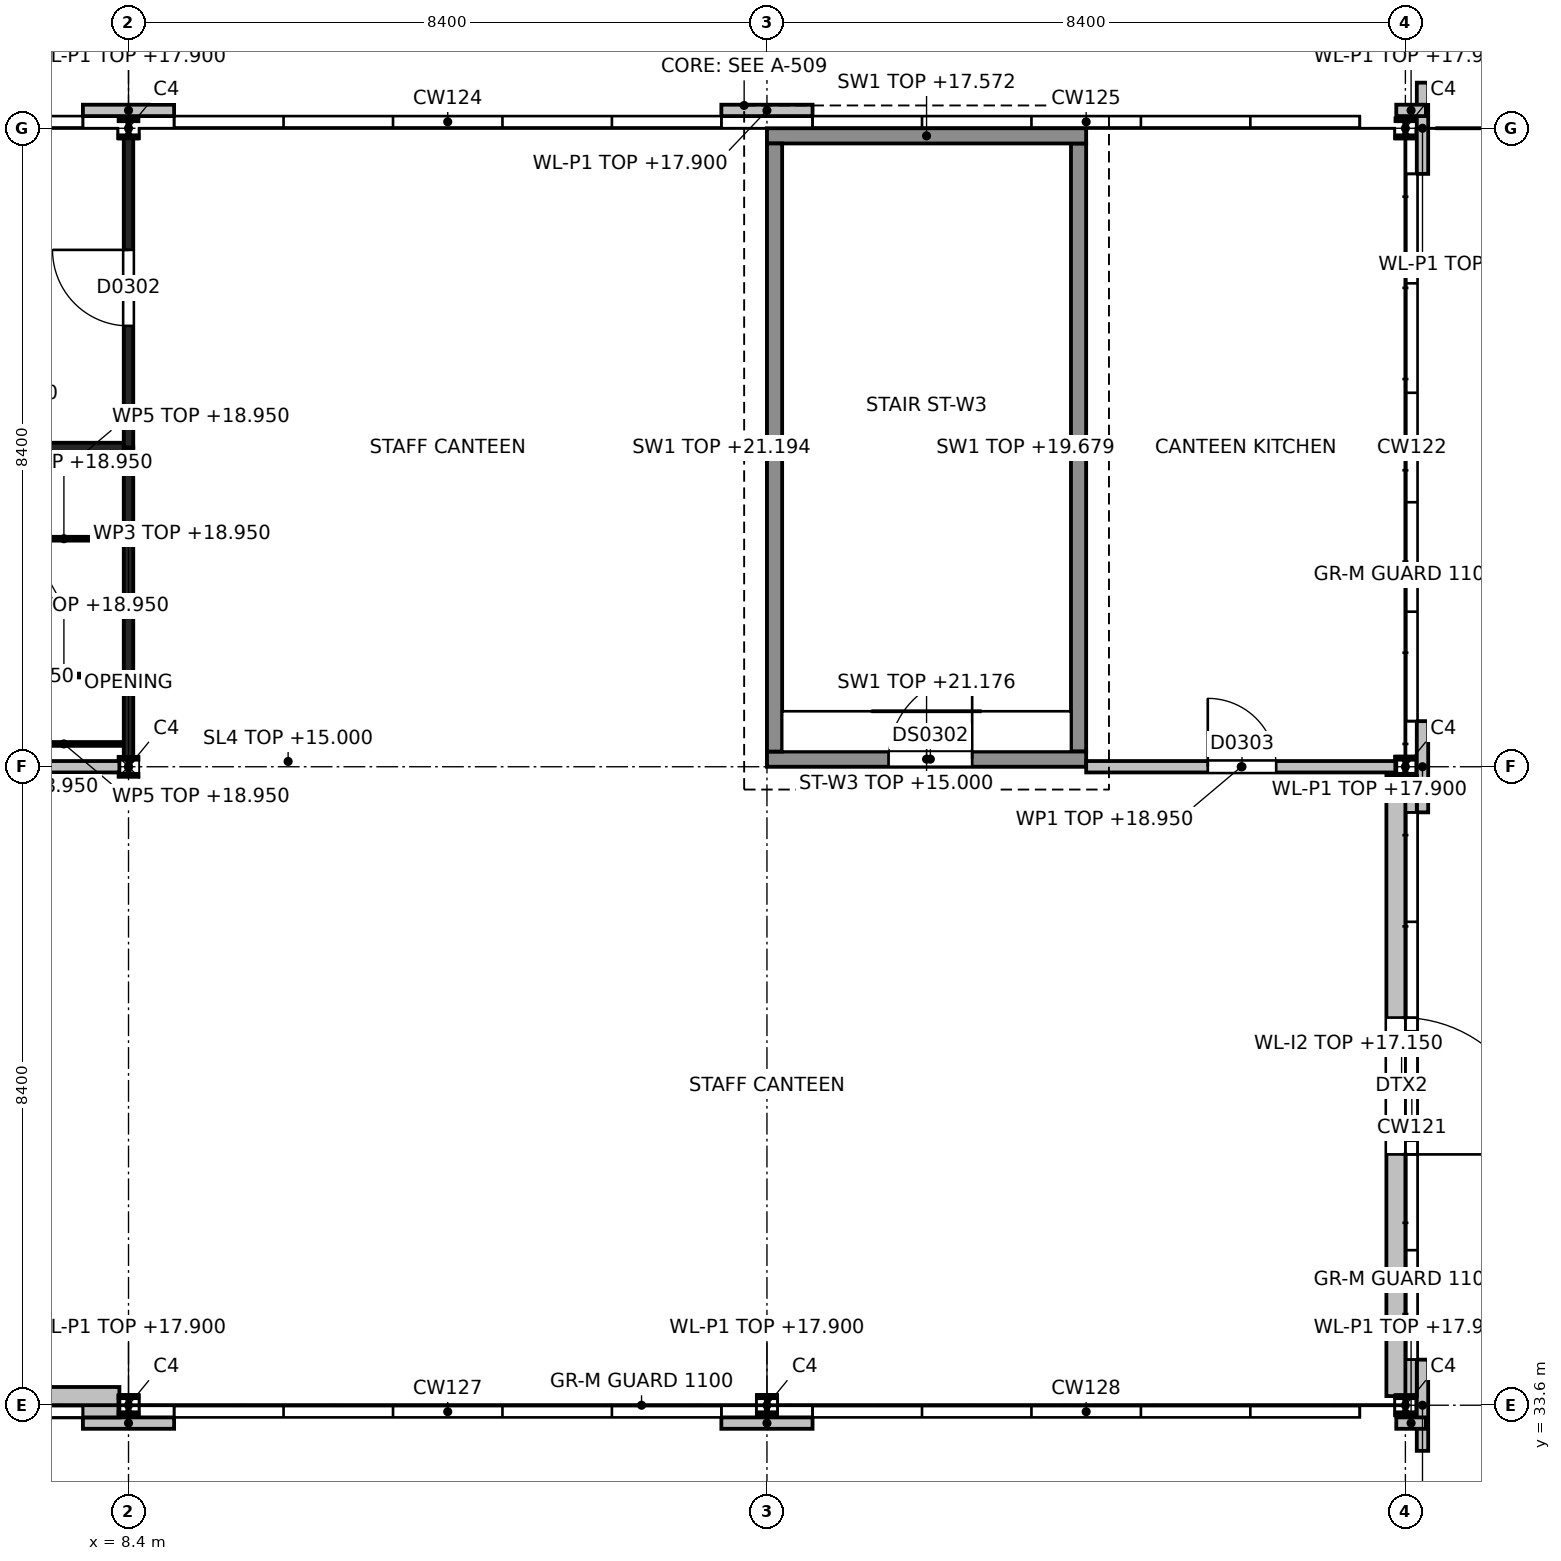
"""IFC4 building model, lengths in metres.
Left out: names, types, materials, properties, quantities, classifications, styles, units other than length and angle.
Written with IfcOpenShell. Run it as: python <this file> out.ifc"""

import sys

from ifc_helpers import new_model, si_unit, direction, frame, frame_2d, origin, origin_2d, place, context, subcontext, project, spatial, polyline, rectangle, i_section, outline, extrude, element, fill, save


model = new_model("IFC4")
c1 = context("Model", 3, precision=1e-05, world=origin(), true_north=direction((0.0, 1.0)))
c2 = subcontext(c1, "Body", "Model", "MODEL_VIEW")
j1 = project(units=[si_unit("LENGTHUNIT", "METRE"), si_unit("PLANEANGLEUNIT", "RADIAN")], contexts=[c1])
p1 = place(None, origin())
s1 = spatial("IfcSite", under=j1, at=p1, CompositionType="ELEMENT")
p2 = place(p1, origin())
s2 = spatial("IfcBuilding", under=s1, at=p2, CompositionType="ELEMENT")
p3 = place(p2, frame((0.0, 0.0, 15.0)))
s3 = spatial("IfcBuildingStorey", under=s2, at=p3, CompositionType="ELEMENT", Elevation=15.0)
p4 = place(p3, frame((8.4, 33.6, 0.0), z_axis=(0.0, 0.0, 1.0), x_axis=(1.0, 0.0, 0.0)))
e1 = element("IfcColumn", 1, at=p4, inside=s3, PredefinedType="COLUMN", context=c2, shape_type="SweptSolid", body=[
    extrude(i_section(OverallWidth=0.24, OverallDepth=0.24, WebThickness=0.01, FlangeThickness=0.017, at=origin_2d()), origin(), (0.0, 0.0, 1.0), 2.635),
])
p5 = place(p3, frame((8.4, 42.0, 0.0), z_axis=(0.0, 0.0, 1.0), x_axis=(1.0, 0.0, 0.0)))
e2 = element("IfcColumn", 2, at=p5, inside=s3, PredefinedType="COLUMN", context=c2, shape_type="SweptSolid", body=[
    extrude(i_section(OverallWidth=0.24, OverallDepth=0.24, WebThickness=0.01, FlangeThickness=0.017, at=origin_2d()), origin(), (0.0, 0.0, 1.0), 6.029),
])
for number, where, z_axis, x_axis in (
    (3, (8.4, 50.4, 0.0), (0.0, 0.0, 1.0), (1.0, 0.0, 0.0)),
    (4, (16.8, 33.6, 0.0), (0.0, 0.0, 1.0), (1.0, 0.0, 0.0)),
    (5, (25.2, 33.6, 0.0), (0.0, 0.0, 1.0), (1.0, 0.0, 0.0)),
    (6, (25.2, 42.0, 0.0), (0.0, 0.0, 1.0), (1.0, 0.0, 0.0)),
    (7, (25.2, 50.4, 0.0), (0.0, 0.0, 1.0), (1.0, 0.0, 0.0)),
):
    element("IfcColumn", number, at=place(p3, frame(where, z_axis=z_axis, x_axis=x_axis)), inside=s3, PredefinedType="COLUMN", context=c2, shape_type="SweptSolid", body=[
        extrude(i_section(OverallWidth=0.24, OverallDepth=0.24, WebThickness=0.01, FlangeThickness=0.017, at=origin_2d()), origin(), (0.0, 0.0, 1.0), 2.635),
    ])
p6 = place(p3, frame((16.8, 42.1, 0.0), z_axis=(0.0, 0.0, 1.0), x_axis=(1.0, 0.0, 0.0)))
e8 = element("IfcWall", 8, at=p6, inside=s3, PredefinedType="SHEAR", context=c2, shape_type="SweptSolid", body=[
    extrude(outline(polyline([(0.0, 0.0), (4.2, 0.0), (4.2, 4.679), (0.494, 6.176), (0.247, 5.875), (0.0, 5.925), (0.0, 0.0)])), frame((0.0, 0.1, 0.0), z_axis=(0.0, -1.0, 0.0), x_axis=(1.0, 0.0, 0.0)), (0.0, 0.0, 1.0), 0.2),
])
p7 = place(p6, frame((1.6, 0.0, 0.0)))
e9 = element("IfcOpeningElement", 9, at=p7, cuts=e8, PredefinedType="OPENING", context=c2, shape_type="SweptSolid", body=[
    extrude(rectangle(XDim=1.1, YDim=2.1, at=frame_2d((0.55, 1.05))), frame((0.0, 0.1, 0.0), z_axis=(0.0, -1.0, 0.0), x_axis=(1.0, 0.0, 0.0)), (0.0, 0.0, 1.0), 0.2),
])
p8 = place(p3, frame((16.8, 50.3, 0.0), z_axis=(0.0, 0.0, 1.0), x_axis=(1.0, 0.0, 0.0)))
e10 = element("IfcWall", 10, at=p8, inside=s3, PredefinedType="SHEAR", context=c2, shape_type="SweptSolid", body=[
    extrude(outline(polyline([(0.0, 0.0), (4.2, 0.0), (4.2, 2.572), (0.0, 2.572), (0.0, 0.0)])), frame((0.0, 0.1, 0.0), z_axis=(0.0, -1.0, 0.0), x_axis=(1.0, 0.0, 0.0)), (0.0, 0.0, 1.0), 0.2),
])
p9 = place(p3, frame((16.9, 42.2, 0.0), z_axis=(0.0, 0.0, 1.0), x_axis=(0.0, 1.0, 0.0)))
e11 = element("IfcWall", 11, at=p9, inside=s3, PredefinedType="SHEAR", context=c2, shape_type="SweptSolid", body=[
    extrude(outline(polyline([(0.0, 0.0), (8.0, 0.0), (8.0, 3.062), (0.25, 6.194), (0.0, 5.885), (0.0, 0.0)])), frame((0.0, 0.1, 0.0), z_axis=(0.0, -1.0, 0.0), x_axis=(1.0, 0.0, 0.0)), (0.0, 0.0, 1.0), 0.2),
])
p10 = place(p3, frame((20.9, 42.2, 0.0), z_axis=(0.0, 0.0, 1.0), x_axis=(0.0, 1.0, 0.0)))
e12 = element("IfcWall", 12, at=p10, inside=s3, PredefinedType="SHEAR", context=c2, shape_type="SweptSolid", body=[
    extrude(outline(polyline([(0.0, 0.0), (8.0, 0.0), (8.0, 3.062), (4.25, 4.578), (4.0, 4.268), (3.75, 4.339), (3.5, 4.679), (0.0, 4.679), (0.0, 0.0)])), frame((0.0, 0.1, 0.0), z_axis=(0.0, -1.0, 0.0), x_axis=(1.0, 0.0, 0.0)), (0.0, 0.0, 1.0), 0.2),
])
for number, where, z_axis, x_axis in (
    (13, (7.8, 50.635, 0.0), (0.0, 0.0, 1.0), (1.0, 0.0, 0.0)),
    (14, (16.2, 50.635, 0.0), (0.0, 0.0, 1.0), (1.0, 0.0, 0.0)),
):
    element("IfcWall", number, at=place(p3, frame(where, z_axis=z_axis, x_axis=x_axis)), inside=s3, PredefinedType="SOLIDWALL", context=c2, shape_type="SweptSolid", body=[
        extrude(rectangle(XDim=1.2, YDim=0.15, at=frame_2d((0.6, 0.0))), origin(), (0.0, 0.0, 1.0), 2.9),
    ])
p11 = place(p3, frame((25.08, 50.635, 0.0), z_axis=(0.0, 0.0, 1.0), x_axis=(1.0, 0.0, 0.0)))
e15 = element("IfcWall", 15, at=p11, inside=s3, PredefinedType="SOLIDWALL", context=c2, shape_type="SweptSolid", body=[
    extrude(rectangle(XDim=0.39, YDim=0.15, at=frame_2d((0.195, 0.0))), origin(), (0.0, 0.0, 1.0), 2.9),
])
p12 = place(p3, frame((25.15, 33.72, 0.0), z_axis=(0.0, 0.0, 1.0), x_axis=(0.0, 1.0, 0.0)))
e16 = element("IfcWall", 16, at=p12, inside=s3, PredefinedType="SOLIDWALL", context=c2, shape_type="SweptSolid", body=[
    extrude(rectangle(XDim=8.16, YDim=0.4, at=frame_2d((4.08, 0.0))), origin(), (0.0, 0.0, 1.0), 2.15),
])
p13 = place(p12, frame((3.18, 0.0, 0.0)))
e17 = element("IfcOpeningElement", 17, at=p13, cuts=e16, PredefinedType="OPENING", context=c2, shape_type="SweptSolid", body=[
    extrude(rectangle(XDim=1.8, YDim=2.4, at=frame_2d((0.9, 1.2))), frame((0.0, 0.2, 0.0), z_axis=(0.0, -1.0, 0.0), x_axis=(1.0, 0.0, 0.0)), (0.0, 0.0, 1.0), 0.4),
])
p14 = place(p3, frame((25.425, 33.0, 0.0), z_axis=(0.0, 0.0, 1.0), x_axis=(0.0, 1.0, 0.0)))
e18 = element("IfcWall", 18, at=p14, inside=s3, PredefinedType="SOLIDWALL", context=c2, shape_type="SweptSolid", body=[
    extrude(rectangle(XDim=1.2, YDim=0.15, at=frame_2d((0.6, 0.0))), origin(), (0.0, 0.0, 1.0), 2.9),
])
p15 = place(p3, frame((25.425, 41.4, 0.0), z_axis=(0.0, 0.0, 1.0), x_axis=(0.0, 1.0, 0.0)))
e19 = element("IfcWall", 19, at=p15, inside=s3, PredefinedType="SOLIDWALL", context=c2, shape_type="SweptSolid", body=[
    extrude(rectangle(XDim=1.2, YDim=0.15, at=frame_2d((0.6, 0.0))), origin(), (0.0, 0.0, 1.0), 2.9),
])
p16 = place(p3, frame((25.425, 49.8, 0.0), z_axis=(0.0, 0.0, 1.0), x_axis=(0.0, 1.0, 0.0)))
e20 = element("IfcWall", 20, at=p16, inside=s3, PredefinedType="SOLIDWALL", context=c2, shape_type="SweptSolid", body=[
    extrude(rectangle(XDim=1.2, YDim=0.15, at=frame_2d((0.6, 0.0))), origin(), (0.0, 0.0, 1.0), 2.9),
])
p17 = place(p3, frame((0.12, 33.64, 0.0), z_axis=(0.0, 0.0, 1.0), x_axis=(1.0, 0.0, 0.0)))
e21 = element("IfcWall", 21, at=p17, inside=s3, PredefinedType="SOLIDWALL", context=c2, shape_type="SweptSolid", body=[
    extrude(rectangle(XDim=8.16, YDim=0.4, at=frame_2d((4.08, 0.0))), origin(), (0.0, 0.0, 1.0), 2.15),
])
p18 = place(p17, frame((3.18, 0.0, 0.0)))
e22 = element("IfcOpeningElement", 22, at=p18, cuts=e21, PredefinedType="OPENING", context=c2, shape_type="SweptSolid", body=[
    extrude(rectangle(XDim=1.8, YDim=2.4, at=frame_2d((0.9, 1.2))), frame((0.0, 0.2, 0.0), z_axis=(0.0, -1.0, 0.0), x_axis=(1.0, 0.0, 0.0)), (0.0, 0.0, 1.0), 0.4),
])
for number, where, z_axis, x_axis in (
    (23, (7.8, 33.365, 0.0), (0.0, 0.0, 1.0), (1.0, 0.0, 0.0)),
    (24, (16.2, 33.365, 0.0), (0.0, 0.0, 1.0), (1.0, 0.0, 0.0)),
):
    element("IfcWall", number, at=place(p3, frame(where, z_axis=z_axis, x_axis=x_axis)), inside=s3, PredefinedType="SOLIDWALL", context=c2, shape_type="SweptSolid", body=[
        extrude(rectangle(XDim=1.2, YDim=0.15, at=frame_2d((0.6, 0.0))), origin(), (0.0, 0.0, 1.0), 2.9),
    ])
p19 = place(p3, frame((25.08, 33.365, 0.0), z_axis=(0.0, 0.0, 1.0), x_axis=(1.0, 0.0, 0.0)))
e25 = element("IfcWall", 25, at=p19, inside=s3, PredefinedType="SOLIDWALL", context=c2, shape_type="SweptSolid", body=[
    extrude(rectangle(XDim=0.39, YDim=0.15, at=frame_2d((0.195, 0.0))), origin(), (0.0, 0.0, 1.0), 2.9),
])
p20 = place(p3, frame((4.2, 42.0, 0.0), z_axis=(0.0, 0.0, 1.0), x_axis=(1.0, 0.0, 0.0)))
e26 = element("IfcWall", 26, at=p20, inside=s3, PredefinedType="PARTITIONING", context=c2, shape_type="SweptSolid", body=[
    extrude(rectangle(XDim=4.08, YDim=0.15, at=frame_2d((2.04, 0.0))), origin(), (0.0, 0.0, 1.0), 3.95),
])
p21 = place(p20, frame((1.6, 0.0, 0.0)))
e27 = element("IfcOpeningElement", 27, at=p21, cuts=e26, PredefinedType="OPENING", context=c2, shape_type="SweptSolid", body=[
    extrude(rectangle(XDim=0.9, YDim=2.1, at=frame_2d((0.45, 1.05))), frame((0.0, 0.075, 0.0), z_axis=(0.0, -1.0, 0.0), x_axis=(1.0, 0.0, 0.0)), (0.0, 0.0, 1.0), 0.15),
])
p22 = place(p3, frame((4.2, 46.2, 0.0), z_axis=(0.0, 0.0, 1.0), x_axis=(1.0, 0.0, 0.0)))
e28 = element("IfcWall", 28, at=p22, inside=s3, PredefinedType="PARTITIONING", context=c2, shape_type="SweptSolid", body=[
    extrude(rectangle(XDim=4.2, YDim=0.125, at=frame_2d((2.1, 0.0))), origin(), (0.0, 0.0, 1.0), 3.95),
])
p23 = place(p3, frame((8.4, 42.12, 0.0), z_axis=(0.0, 0.0, 1.0), x_axis=(0.0, 1.0, 0.0)))
e29 = element("IfcWall", 29, at=p23, inside=s3, PredefinedType="PARTITIONING", context=c2, shape_type="SweptSolid", body=[
    extrude(rectangle(XDim=4.08, YDim=0.125, at=frame_2d((2.04, 0.0))), origin(), (0.0, 0.0, 1.0), 3.95),
])
p24 = place(p3, frame((8.4, 46.2, 0.0), z_axis=(0.0, 0.0, 1.0), x_axis=(0.0, 1.0, 0.0)))
e30 = element("IfcWall", 30, at=p24, inside=s3, PredefinedType="PARTITIONING", context=c2, shape_type="SweptSolid", body=[
    extrude(rectangle(XDim=4.08, YDim=0.125, at=frame_2d((2.04, 0.0))), origin(), (0.0, 0.0, 1.0), 3.95),
])
p25 = place(p24, frame((1.6, 0.0, 0.0)))
e31 = element("IfcOpeningElement", 31, at=p25, cuts=e30, PredefinedType="OPENING", context=c2, shape_type="SweptSolid", body=[
    extrude(rectangle(XDim=1.0, YDim=2.1, at=frame_2d((0.5, 1.05))), frame((0.0, 0.062, 0.0), z_axis=(0.0, -1.0, 0.0), x_axis=(1.0, 0.0, 0.0)), (0.0, 0.0, 1.0), 0.125),
])
p26 = place(p3, frame((21.0, 42.0, 0.0), z_axis=(0.0, 0.0, 1.0), x_axis=(1.0, 0.0, 0.0)))
e32 = element("IfcWall", 32, at=p26, inside=s3, PredefinedType="PARTITIONING", context=c2, shape_type="SweptSolid", body=[
    extrude(rectangle(XDim=4.08, YDim=0.15, at=frame_2d((2.04, 0.0))), origin(), (0.0, 0.0, 1.0), 3.95),
])
p27 = place(p26, frame((1.6, 0.0, 0.0)))
e33 = element("IfcOpeningElement", 33, at=p27, cuts=e32, PredefinedType="OPENING", context=c2, shape_type="SweptSolid", body=[
    extrude(rectangle(XDim=0.9, YDim=2.1, at=frame_2d((0.45, 1.05))), frame((0.0, 0.075, 0.0), z_axis=(0.0, -1.0, 0.0), x_axis=(1.0, 0.0, 0.0)), (0.0, 0.0, 1.0), 0.15),
])
for number, where, z_axis, x_axis in (
    (34, (8.4, 42.3, 0.0), (0.0, 0.0, 1.0), (-1.0, 0.0, 0.0)),
    (35, (8.4, 43.2, 0.0), (0.0, 0.0, 1.0), (-1.0, 0.0, 0.0)),
    (36, (8.4, 44.1, 0.0), (0.0, 0.0, 1.0), (-1.0, 0.0, 0.0)),
    (37, (8.4, 45.0, 0.0), (0.0, 0.0, 1.0), (-1.0, 0.0, 0.0)),
    (38, (8.4, 45.9, 0.0), (0.0, 0.0, 1.0), (-1.0, 0.0, 0.0)),
):
    element("IfcWall", number, at=place(p3, frame(where, z_axis=z_axis, x_axis=x_axis)), inside=s3, PredefinedType="PARTITIONING", context=c2, shape_type="SweptSolid", body=[
        extrude(rectangle(XDim=1.7, YDim=0.05, at=frame_2d((0.85, 0.0))), origin(), (0.0, 0.0, 1.0), 3.95),
    ])
p28 = place(p13, origin())
e39 = element("IfcDoor", 39, at=p28, inside=s3, OperationType="DOUBLE_DOOR_SINGLE_SWING", PredefinedType="DOOR", context=c2, shape_type="SweptSolid", body=[
    extrude(rectangle(XDim=1.8, YDim=2.4, at=frame_2d((0.9, 1.2))), frame((0.0, 0.025, 0.0), z_axis=(0.0, -1.0, 0.0), x_axis=(1.0, 0.0, 0.0)), (0.0, 0.0, 1.0), 0.05),
])
fill(e17, e39)
p29 = place(p25, origin())
e40 = element("IfcDoor", 40, at=p29, inside=s3, OperationType="SINGLE_SWING_RIGHT", PredefinedType="DOOR", context=c2, shape_type="SweptSolid", body=[
    extrude(rectangle(XDim=1.0, YDim=2.1, at=frame_2d((0.5, 1.05))), frame((0.0, 0.025, 0.0), z_axis=(0.0, -1.0, 0.0), x_axis=(1.0, 0.0, 0.0)), (0.0, 0.0, 1.0), 0.05),
])
fill(e31, e40)
p30 = place(p27, origin())
e41 = element("IfcDoor", 41, at=p30, inside=s3, OperationType="SINGLE_SWING_LEFT", PredefinedType="DOOR", context=c2, shape_type="SweptSolid", body=[
    extrude(rectangle(XDim=0.9, YDim=2.1, at=frame_2d((0.45, 1.05))), frame((0.0, 0.025, 0.0), z_axis=(0.0, -1.0, 0.0), x_axis=(1.0, 0.0, 0.0)), (0.0, 0.0, 1.0), 0.05),
])
fill(e33, e41)
p31 = place(p7, origin())
e42 = element("IfcDoor", 42, at=p31, inside=s3, OperationType="SINGLE_SWING_RIGHT", PredefinedType="DOOR", context=c2, shape_type="SweptSolid", body=[
    extrude(rectangle(XDim=1.1, YDim=2.1, at=frame_2d((0.55, 1.05))), frame((0.0, 0.025, 0.0), z_axis=(0.0, -1.0, 0.0), x_axis=(1.0, 0.0, 0.0)), (0.0, 0.0, 1.0), 0.05),
])
fill(e9, e42)
save(model, sys.argv[1])
